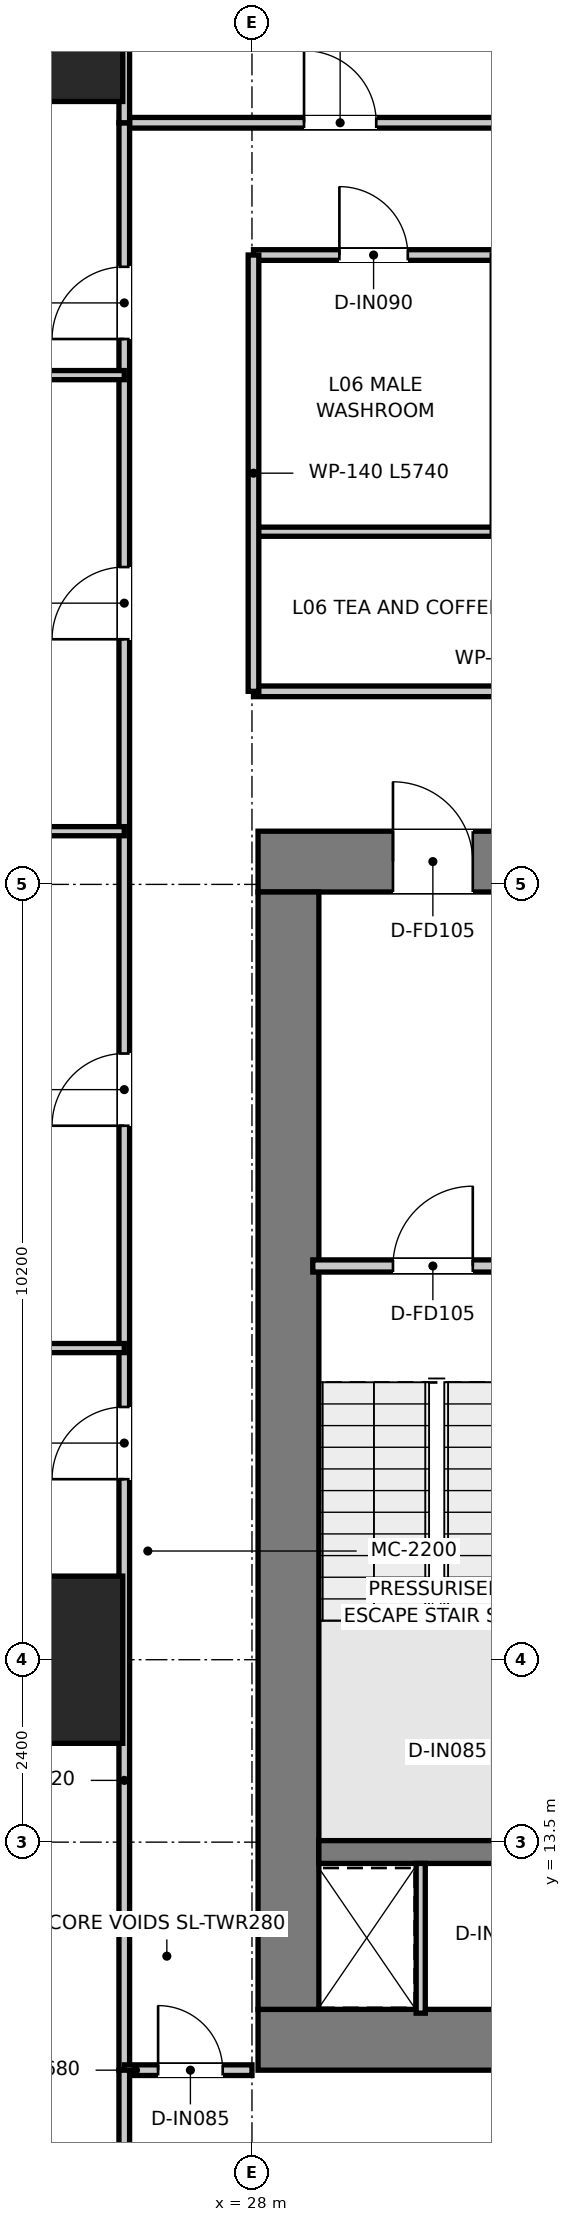
"""IFC4 building model, lengths in metres.
Left out: names, types, materials, properties, quantities, classifications, styles, units other than length and angle.
Written with IfcOpenShell. Run it as: python <this file> out.ifc"""

import sys

from ifc_helpers import new_model, si_unit, direction, frame, frame_2d, origin, origin_2d, place, context, subcontext, project, spatial, rectangle, extrude, source, transform, mapped, element, fill, save


model = new_model("IFC4")
c1 = context("Model", 3, precision=1e-05, world=origin(), true_north=direction((0.0, 1.0)))
c2 = subcontext(c1, "Body", "Model", "MODEL_VIEW")
j1 = project(units=[si_unit("LENGTHUNIT", "METRE"), si_unit("PLANEANGLEUNIT", "RADIAN")], contexts=[c1])
p1 = place(None, origin())
s1 = spatial("IfcSite", under=j1, at=p1, CompositionType="ELEMENT")
p2 = place(p1, origin())
s2 = spatial("IfcBuilding", under=s1, at=p2, CompositionType="ELEMENT")
p3 = place(p2, frame((0.0, 0.0, 28.95)))
s3 = spatial("IfcBuildingStorey", under=s2, at=p3, CompositionType="ELEMENT", Elevation=28.95)
p4 = place(p3, frame((28.08, 10.9, 0.0), z_axis=(0.0, 0.0, 1.0), x_axis=(1.0, 0.0, 0.0)))
e1 = element("IfcWall", 1, at=p4, inside=s3, PredefinedType="SHEAR", context=c2, shape_type="SweptSolid", body=[
    extrude(rectangle(XDim=15.84, YDim=0.8, at=frame_2d((7.92, 0.0))), origin(), (0.0, 0.0, 1.0), 3.95),
])
p5 = place(p3, frame((28.08, 26.4, 0.0), z_axis=(0.0, 0.0, 1.0), x_axis=(1.0, 0.0, 0.0)))
e2 = element("IfcWall", 2, at=p5, inside=s3, PredefinedType="SHEAR", context=c2, shape_type="SweptSolid", body=[
    extrude(rectangle(XDim=15.84, YDim=0.8, at=frame_2d((7.92, 0.0))), origin(), (0.0, 0.0, 1.0), 3.95),
])
p6 = place(p5, frame((7.22, 0.0, 0.0)))
e3 = element("IfcOpeningElement", 3, at=p6, cuts=e2, PredefinedType="OPENING", context=c2, shape_type="SweptSolid", body=[
    extrude(rectangle(XDim=1.4, YDim=2.2, at=frame_2d((0.7, 1.1))), frame((0.0, 0.41, 0.0), z_axis=(0.0, -1.0, 0.0), x_axis=(1.0, 0.0, 0.0)), (0.0, 0.0, 1.0), 0.82),
])
p7 = place(p5, frame((1.775, 0.0, 0.0)))
e4 = element("IfcOpeningElement", 4, at=p7, cuts=e2, PredefinedType="OPENING", context=c2, shape_type="SweptSolid", body=[
    extrude(rectangle(XDim=1.05, YDim=2.1, at=frame_2d((0.525, 1.05))), frame((0.0, 0.41, 0.0), z_axis=(0.0, -1.0, 0.0), x_axis=(1.0, 0.0, 0.0)), (0.0, 0.0, 1.0), 0.82),
])
p8 = place(p5, frame((13.015, 0.0, 0.0)))
e5 = element("IfcOpeningElement", 5, at=p8, cuts=e2, PredefinedType="OPENING", context=c2, shape_type="SweptSolid", body=[
    extrude(rectangle(XDim=1.05, YDim=2.1, at=frame_2d((0.525, 1.05))), frame((0.0, 0.41, 0.0), z_axis=(0.0, -1.0, 0.0), x_axis=(1.0, 0.0, 0.0)), (0.0, 0.0, 1.0), 0.82),
])
p9 = place(p3, frame((28.48, 11.3, 0.0), z_axis=(0.0, 0.0, 1.0), x_axis=(0.0, 1.0, 0.0)))
e6 = element("IfcWall", 6, at=p9, inside=s3, PredefinedType="SHEAR", context=c2, shape_type="SweptSolid", body=[
    extrude(rectangle(XDim=14.7, YDim=0.8, at=frame_2d((7.35, 0.0))), origin(), (0.0, 0.0, 1.0), 3.95),
])
p10 = place(p3, frame((28.88, 13.37, 0.0), z_axis=(0.0, 0.0, 1.0), x_axis=(1.0, 0.0, 0.0)))
e7 = element("IfcWall", 7, at=p10, inside=s3, PredefinedType="SHEAR", context=c2, shape_type="SweptSolid", body=[
    extrude(rectangle(XDim=3.1, YDim=0.3, at=frame_2d((1.55, 0.0))), origin(), (0.0, 0.0, 1.0), 3.95),
])
m1 = source(origin(), c2, "Body", "SweptSolid", [
    extrude(rectangle(XDim=2.2, YDim=2.2, at=origin_2d()), origin(), (0.0, 0.0, 1.0), 3.95),
])
for number, where, z_axis, x_axis in (
    (8, (25.2, 15.9, 0.0), (0.0, 0.0, 1.0), (1.0, 0.0, 0.0)),
    (9, (25.2, 37.5, 0.0), (0.0, 0.0, 1.0), (1.0, 0.0, 0.0)),
):
    element("IfcColumn", number, at=place(p3, frame(where, z_axis=z_axis, x_axis=x_axis)), inside=s3, PredefinedType="USERDEFINED", context=c2, shape_type="MappedRepresentation", body=[
        mapped(m1, transform((0.0, 0.0, 0.0), x_axis=(1.0, 0.0, 0.0), y_axis=(0.0, 1.0, 0.0), z_axis=(0.0, 0.0, 1.0), scale=1.0)),
    ])
p11 = place(p3, frame((28.8, 21.08, 0.0), z_axis=(0.0, 0.0, 1.0), x_axis=(1.0, 0.0, 0.0)))
e10 = element("IfcWall", 10, at=p11, inside=s3, PredefinedType="PARTITIONING", context=c2, shape_type="SweptSolid", body=[
    extrude(rectangle(XDim=3.16, YDim=0.16, at=frame_2d((1.58, 0.0))), origin(), (0.0, 0.0, 1.0), 3.67),
])
p12 = place(p11, frame((1.055, 0.0, 0.0)))
e11 = element("IfcOpeningElement", 11, at=p12, cuts=e10, PredefinedType="OPENING", context=c2, shape_type="SweptSolid", body=[
    extrude(rectangle(XDim=1.05, YDim=2.1, at=frame_2d((0.525, 1.05))), frame((0.0, 0.09, 0.0), z_axis=(0.0, -1.0, 0.0), x_axis=(1.0, 0.0, 0.0)), (0.0, 0.0, 1.0), 0.18),
])
p13 = place(p3, frame((30.22, 11.25, 0.0), z_axis=(0.0, 0.0, 1.0), x_axis=(0.0, 1.0, 0.0)))
e12 = element("IfcWall", 12, at=p13, inside=s3, PredefinedType="PARTITIONING", context=c2, shape_type="SweptSolid", body=[
    extrude(rectangle(XDim=1.97, YDim=0.12, at=frame_2d((0.985, 0.0))), origin(), (0.0, 0.0, 1.0), 3.67),
])
p14 = place(p3, frame((28.02, 28.64, 0.0), z_axis=(0.0, 0.0, 1.0), x_axis=(1.0, 0.0, 0.0)))
e13 = element("IfcWall", 13, at=p14, inside=s3, PredefinedType="PARTITIONING", context=c2, shape_type="SweptSolid", body=[
    extrude(rectangle(XDim=15.96, YDim=0.14, at=frame_2d((7.98, 0.0))), origin(), (0.0, 0.0, 1.0), 3.08),
])
p15 = place(p14, frame((7.455, 0.0, 0.0)))
e14 = element("IfcOpeningElement", 14, at=p15, cuts=e13, PredefinedType="OPENING", context=c2, shape_type="SweptSolid", body=[
    extrude(rectangle(XDim=1.05, YDim=2.15, at=frame_2d((0.525, 1.075))), frame((0.0, 0.08, 0.0), z_axis=(0.0, -1.0, 0.0), x_axis=(1.0, 0.0, 0.0)), (0.0, 0.0, 1.0), 0.16),
])
p16 = place(p3, frame((28.02, 30.74, 0.0), z_axis=(0.0, 0.0, 1.0), x_axis=(1.0, 0.0, 0.0)))
e15 = element("IfcWall", 15, at=p16, inside=s3, PredefinedType="PARTITIONING", context=c2, shape_type="SweptSolid", body=[
    extrude(rectangle(XDim=15.96, YDim=0.12, at=frame_2d((7.98, 0.0))), origin(), (0.0, 0.0, 1.0), 3.08),
])
p17 = place(p3, frame((28.02, 34.38, 0.0), z_axis=(0.0, 0.0, 1.0), x_axis=(1.0, 0.0, 0.0)))
e16 = element("IfcWall", 16, at=p17, inside=s3, PredefinedType="PARTITIONING", context=c2, shape_type="SweptSolid", body=[
    extrude(rectangle(XDim=15.96, YDim=0.14, at=frame_2d((7.98, 0.0))), origin(), (0.0, 0.0, 1.0), 3.08),
])
p18 = place(p17, frame((1.13, 0.0, 0.0)))
e17 = element("IfcOpeningElement", 17, at=p18, cuts=e16, PredefinedType="OPENING", context=c2, shape_type="SweptSolid", body=[
    extrude(rectangle(XDim=0.9, YDim=2.1, at=frame_2d((0.45, 1.05))), frame((0.0, 0.08, 0.0), z_axis=(0.0, -1.0, 0.0), x_axis=(1.0, 0.0, 0.0)), (0.0, 0.0, 1.0), 0.16),
])
p19 = place(p17, frame((4.33, 0.0, 0.0)))
e18 = element("IfcOpeningElement", 18, at=p19, cuts=e16, PredefinedType="OPENING", context=c2, shape_type="SweptSolid", body=[
    extrude(rectangle(XDim=0.9, YDim=2.1, at=frame_2d((0.45, 1.05))), frame((0.0, 0.08, 0.0), z_axis=(0.0, -1.0, 0.0), x_axis=(1.0, 0.0, 0.0)), (0.0, 0.0, 1.0), 0.16),
])
p20 = place(p17, frame((7.355, 0.0, 0.0)))
e19 = element("IfcOpeningElement", 19, at=p20, cuts=e16, PredefinedType="OPENING", context=c2, shape_type="SweptSolid", body=[
    extrude(rectangle(XDim=0.95, YDim=2.1, at=frame_2d((0.475, 1.05))), frame((0.0, 0.08, 0.0), z_axis=(0.0, -1.0, 0.0), x_axis=(1.0, 0.0, 0.0)), (0.0, 0.0, 1.0), 0.16),
])
p21 = place(p17, frame((12.23, 0.0, 0.0)))
e20 = element("IfcOpeningElement", 20, at=p21, cuts=e16, PredefinedType="OPENING", context=c2, shape_type="SweptSolid", body=[
    extrude(rectangle(XDim=0.95, YDim=2.1, at=frame_2d((0.475, 1.05))), frame((0.0, 0.08, 0.0), z_axis=(0.0, -1.0, 0.0), x_axis=(1.0, 0.0, 0.0)), (0.0, 0.0, 1.0), 0.16),
])
p22 = place(p3, frame((28.02, 28.64, 0.0), z_axis=(0.0, 0.0, 1.0), x_axis=(0.0, 1.0, 0.0)))
e21 = element("IfcWall", 21, at=p22, inside=s3, PredefinedType="PARTITIONING", context=c2, shape_type="SweptSolid", body=[
    extrude(rectangle(XDim=5.74, YDim=0.14, at=frame_2d((2.87, 0.0))), origin(), (0.0, 0.0, 1.0), 3.22),
])
p23 = place(p3, frame((26.32, 36.12, 0.0), z_axis=(0.0, 0.0, 1.0), x_axis=(1.0, 0.0, 0.0)))
e22 = element("IfcWall", 22, at=p23, inside=s3, PredefinedType="PARTITIONING", context=c2, shape_type="SweptSolid", body=[
    extrude(rectangle(XDim=19.36, YDim=0.14, at=frame_2d((9.68, 0.0))), origin(), (0.0, 0.0, 1.0), 3.08),
])
p24 = place(p23, frame((2.365, 0.0, 0.0)))
e23 = element("IfcOpeningElement", 23, at=p24, cuts=e22, PredefinedType="OPENING", context=c2, shape_type="SweptSolid", body=[
    extrude(rectangle(XDim=0.95, YDim=2.1, at=frame_2d((0.475, 1.05))), frame((0.0, 0.08, 0.0), z_axis=(0.0, -1.0, 0.0), x_axis=(1.0, 0.0, 0.0)), (0.0, 0.0, 1.0), 0.16),
])
p25 = place(p23, frame((9.205, 0.0, 0.0)))
e24 = element("IfcOpeningElement", 24, at=p25, cuts=e22, PredefinedType="OPENING", context=c2, shape_type="SweptSolid", body=[
    extrude(rectangle(XDim=0.95, YDim=2.1, at=frame_2d((0.475, 1.05))), frame((0.0, 0.08, 0.0), z_axis=(0.0, -1.0, 0.0), x_axis=(1.0, 0.0, 0.0)), (0.0, 0.0, 1.0), 0.16),
])
p26 = place(p23, frame((16.045, 0.0, 0.0)))
e25 = element("IfcOpeningElement", 25, at=p26, cuts=e22, PredefinedType="OPENING", context=c2, shape_type="SweptSolid", body=[
    extrude(rectangle(XDim=0.95, YDim=2.1, at=frame_2d((0.475, 1.05))), frame((0.0, 0.08, 0.0), z_axis=(0.0, -1.0, 0.0), x_axis=(1.0, 0.0, 0.0)), (0.0, 0.0, 1.0), 0.16),
])
p27 = place(p3, frame((26.32, 10.5, 0.0), z_axis=(0.0, 0.0, 1.0), x_axis=(0.0, 1.0, 0.0)))
e26 = element("IfcWall", 26, at=p27, inside=s3, PredefinedType="PARTITIONING", context=c2, shape_type="SweptSolid", body=[
    extrude(rectangle(XDim=25.62, YDim=0.14, at=frame_2d((12.81, 0.0))), origin(), (0.0, 0.0, 1.0), 2.97),
])
p28 = place(p27, frame((7.775, 0.0, 0.0)))
e27 = element("IfcOpeningElement", 27, at=p28, cuts=e26, PredefinedType="OPENING", context=c2, shape_type="SweptSolid", body=[
    extrude(rectangle(XDim=0.95, YDim=2.1, at=frame_2d((0.475, 1.05))), frame((0.0, 0.08, 0.0), z_axis=(0.0, -1.0, 0.0), x_axis=(1.0, 0.0, 0.0)), (0.0, 0.0, 1.0), 0.16),
])
p29 = place(p27, frame((12.425, 0.0, 0.0)))
e28 = element("IfcOpeningElement", 28, at=p29, cuts=e26, PredefinedType="OPENING", context=c2, shape_type="SweptSolid", body=[
    extrude(rectangle(XDim=0.95, YDim=2.1, at=frame_2d((0.475, 1.05))), frame((0.0, 0.08, 0.0), z_axis=(0.0, -1.0, 0.0), x_axis=(1.0, 0.0, 0.0)), (0.0, 0.0, 1.0), 0.16),
])
p30 = place(p27, frame((18.825, 0.0, 0.0)))
e29 = element("IfcOpeningElement", 29, at=p30, cuts=e26, PredefinedType="OPENING", context=c2, shape_type="SweptSolid", body=[
    extrude(rectangle(XDim=0.95, YDim=2.1, at=frame_2d((0.475, 1.05))), frame((0.0, 0.08, 0.0), z_axis=(0.0, -1.0, 0.0), x_axis=(1.0, 0.0, 0.0)), (0.0, 0.0, 1.0), 0.16),
])
p31 = place(p27, frame((22.775, 0.0, 0.0)))
e30 = element("IfcOpeningElement", 30, at=p31, cuts=e26, PredefinedType="OPENING", context=c2, shape_type="SweptSolid", body=[
    extrude(rectangle(XDim=0.95, YDim=2.1, at=frame_2d((0.475, 1.05))), frame((0.0, 0.08, 0.0), z_axis=(0.0, -1.0, 0.0), x_axis=(1.0, 0.0, 0.0)), (0.0, 0.0, 1.0), 0.16),
])
p32 = place(p3, frame((26.32, 10.5, 0.0), z_axis=(0.0, 0.0, 1.0), x_axis=(1.0, 0.0, 0.0)))
e31 = element("IfcWall", 31, at=p32, inside=s3, PredefinedType="PARTITIONING", context=c2, shape_type="SweptSolid", body=[
    extrude(rectangle(XDim=1.68, YDim=0.14, at=frame_2d((0.84, 0.0))), origin(), (0.0, 0.0, 1.0), 3.67),
])
p33 = place(p32, frame((0.445, 0.0, 0.0)))
e32 = element("IfcOpeningElement", 32, at=p33, cuts=e31, PredefinedType="OPENING", context=c2, shape_type="SweptSolid", body=[
    extrude(rectangle(XDim=0.85, YDim=2.1, at=frame_2d((0.425, 1.05))), frame((0.0, 0.08, 0.0), z_axis=(0.0, -1.0, 0.0), x_axis=(1.0, 0.0, 0.0)), (0.0, 0.0, 1.0), 0.16),
])
p34 = place(p3, frame((26.32, 36.12, 0.0), z_axis=(0.0, 0.0, 1.0), x_axis=(0.0, 1.0, 0.0)))
e33 = element("IfcWall", 33, at=p34, inside=s3, PredefinedType="PARTITIONING", context=c2, shape_type="SweptSolid", body=[
    extrude(rectangle(XDim=15.49, YDim=0.14, at=frame_2d((7.745, 0.0))), origin(), (0.0, 0.0, 1.0), 2.97),
])
p35 = place(p3, frame((26.32, 1.79, 0.0), z_axis=(0.0, 0.0, 1.0), x_axis=(0.0, 1.0, 0.0)))
e34 = element("IfcWall", 34, at=p35, inside=s3, PredefinedType="PARTITIONING", context=c2, shape_type="SweptSolid", body=[
    extrude(rectangle(XDim=8.71, YDim=0.14, at=frame_2d((4.355, 0.0))), origin(), (0.0, 0.0, 1.0), 3.67),
])
for number, where, z_axis, x_axis in (
    (35, (11.09, 20.0, 0.0), (0.0, 0.0, 1.0), (1.0, 0.0, 0.0)),
    (36, (11.09, 26.8, 0.0), (0.0, 0.0, 1.0), (1.0, 0.0, 0.0)),
    (37, (11.09, 32.8, 0.0), (0.0, 0.0, 1.0), (1.0, 0.0, 0.0)),
):
    element("IfcWall", number, at=place(p3, frame(where, z_axis=z_axis, x_axis=x_axis)), inside=s3, PredefinedType="PARTITIONING", context=c2, shape_type="SweptSolid", body=[
        extrude(rectangle(XDim=15.23, YDim=0.12, at=frame_2d((7.615, 0.0))), origin(), (0.0, 0.0, 1.0), 2.97),
    ])
p36 = place(p12, origin())
e38 = element("IfcDoor", 38, at=p36, inside=s3, OperationType="SINGLE_SWING_RIGHT", PredefinedType="DOOR", context=c2, shape_type="SweptSolid", body=[
    extrude(rectangle(XDim=1.05, YDim=2.1, at=frame_2d((0.525, 1.05))), frame((0.0, 0.025, 0.0), z_axis=(0.0, -1.0, 0.0), x_axis=(1.0, 0.0, 0.0)), (0.0, 0.0, 1.0), 0.05),
])
fill(e11, e38)
p37 = place(p7, origin())
e39 = element("IfcDoor", 39, at=p37, inside=s3, OperationType="SINGLE_SWING_LEFT", PredefinedType="DOOR", context=c2, shape_type="SweptSolid", body=[
    extrude(rectangle(XDim=1.05, YDim=2.1, at=frame_2d((0.525, 1.05))), frame((0.0, 0.025, 0.0), z_axis=(0.0, -1.0, 0.0), x_axis=(1.0, 0.0, 0.0)), (0.0, 0.0, 1.0), 0.05),
])
fill(e4, e39)
p38 = place(p18, origin())
e40 = element("IfcDoor", 40, at=p38, inside=s3, OperationType="SINGLE_SWING_LEFT", PredefinedType="DOOR", context=c2, shape_type="SweptSolid", body=[
    extrude(rectangle(XDim=0.9, YDim=2.1, at=frame_2d((0.45, 1.05))), frame((0.0, 0.025, 0.0), z_axis=(0.0, -1.0, 0.0), x_axis=(1.0, 0.0, 0.0)), (0.0, 0.0, 1.0), 0.05),
])
fill(e17, e40)
p39 = place(p24, origin())
e41 = element("IfcDoor", 41, at=p39, inside=s3, OperationType="SINGLE_SWING_LEFT", PredefinedType="DOOR", context=c2, shape_type="SweptSolid", body=[
    extrude(rectangle(XDim=0.95, YDim=2.1, at=frame_2d((0.475, 1.05))), frame((0.0, 0.025, 0.0), z_axis=(0.0, -1.0, 0.0), x_axis=(1.0, 0.0, 0.0)), (0.0, 0.0, 1.0), 0.05),
])
fill(e23, e41)
p40 = place(p28, origin())
e42 = element("IfcDoor", 42, at=p40, inside=s3, OperationType="SINGLE_SWING_LEFT", PredefinedType="DOOR", context=c2, shape_type="SweptSolid", body=[
    extrude(rectangle(XDim=0.95, YDim=2.1, at=frame_2d((0.475, 1.05))), frame((0.0, 0.025, 0.0), z_axis=(0.0, -1.0, 0.0), x_axis=(1.0, 0.0, 0.0)), (0.0, 0.0, 1.0), 0.05),
])
fill(e27, e42)
p41 = place(p29, origin())
e43 = element("IfcDoor", 43, at=p41, inside=s3, OperationType="SINGLE_SWING_LEFT", PredefinedType="DOOR", context=c2, shape_type="SweptSolid", body=[
    extrude(rectangle(XDim=0.95, YDim=2.1, at=frame_2d((0.475, 1.05))), frame((0.0, 0.025, 0.0), z_axis=(0.0, -1.0, 0.0), x_axis=(1.0, 0.0, 0.0)), (0.0, 0.0, 1.0), 0.05),
])
fill(e28, e43)
p42 = place(p30, origin())
e44 = element("IfcDoor", 44, at=p42, inside=s3, OperationType="SINGLE_SWING_LEFT", PredefinedType="DOOR", context=c2, shape_type="SweptSolid", body=[
    extrude(rectangle(XDim=0.95, YDim=2.1, at=frame_2d((0.475, 1.05))), frame((0.0, 0.025, 0.0), z_axis=(0.0, -1.0, 0.0), x_axis=(1.0, 0.0, 0.0)), (0.0, 0.0, 1.0), 0.05),
])
fill(e29, e44)
p43 = place(p31, origin())
e45 = element("IfcDoor", 45, at=p43, inside=s3, OperationType="SINGLE_SWING_LEFT", PredefinedType="DOOR", context=c2, shape_type="SweptSolid", body=[
    extrude(rectangle(XDim=0.95, YDim=2.1, at=frame_2d((0.475, 1.05))), frame((0.0, 0.025, 0.0), z_axis=(0.0, -1.0, 0.0), x_axis=(1.0, 0.0, 0.0)), (0.0, 0.0, 1.0), 0.05),
])
fill(e30, e45)
p44 = place(p33, origin())
e46 = element("IfcDoor", 46, at=p44, inside=s3, OperationType="SINGLE_SWING_LEFT", PredefinedType="DOOR", context=c2, shape_type="SweptSolid", body=[
    extrude(rectangle(XDim=0.85, YDim=2.1, at=frame_2d((0.425, 1.05))), frame((0.0, 0.025, 0.0), z_axis=(0.0, -1.0, 0.0), x_axis=(1.0, 0.0, 0.0)), (0.0, 0.0, 1.0), 0.05),
])
fill(e32, e46)
save(model, sys.argv[1])
